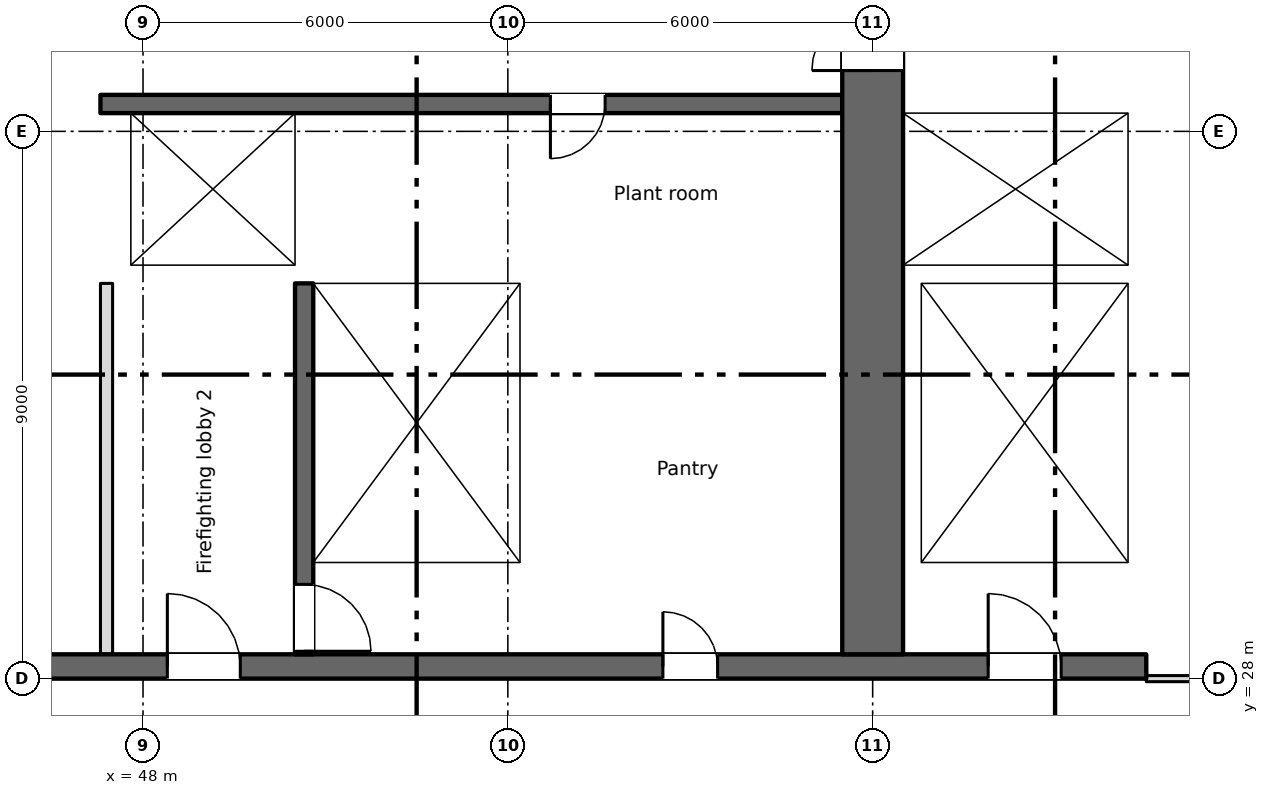
"""IFC4 building model, lengths in metres.
Left out: names, types, materials, properties, quantities, classifications, styles, units other than length and angle.
Written with IfcOpenShell. Run it as: python <this file> out.ifc"""

import sys

from ifc_helpers import new_model, si_unit, direction, frame, frame_2d, origin, place, context, subcontext, project, spatial, rectangle, extrude, element, fill, save


model = new_model("IFC4")
c1 = context("Model", 3, precision=1e-05, world=origin(), true_north=direction((0.0, 1.0)))
c2 = subcontext(c1, "Body", "Model", "MODEL_VIEW")
j1 = project(units=[si_unit("LENGTHUNIT", "METRE"), si_unit("PLANEANGLEUNIT", "RADIAN")], contexts=[c1])
p1 = place(None, origin())
s1 = spatial("IfcSite", under=j1, at=p1, CompositionType="ELEMENT")
p2 = place(p1, origin())
s2 = spatial("IfcBuilding", under=s1, at=p2, CompositionType="ELEMENT")
p3 = place(p2, frame((0.0, 0.0, 26.25)))
s3 = spatial("IfcBuildingStorey", under=s2, at=p3, CompositionType="ELEMENT", Elevation=26.25)
p4 = place(p3, frame((6.7, 28.2, 0.0), z_axis=(0.0, 0.0, 1.0), x_axis=(1.0, 0.0, 0.0)))
e1 = element("IfcWall", 1, at=p4, inside=s3, PredefinedType="SHEAR", context=c2, shape_type="SweptSolid", body=[
    extrude(rectangle(XDim=57.8, YDim=0.4, at=frame_2d((28.9, 0.0))), origin(), (0.0, 0.0, 1.0), 3.35),
])
p5 = place(p4, frame((12.562, 0.0, 0.0)))
e2 = element("IfcOpeningElement", 2, at=p5, cuts=e1, PredefinedType="OPENING", context=c2, shape_type="SweptSolid", body=[
    extrude(rectangle(XDim=0.9, YDim=2.1, at=frame_2d((0.45, 1.05))), frame((0.0, 0.21, 0.0), z_axis=(0.0, -1.0, 0.0), x_axis=(1.0, 0.0, 0.0)), (0.0, 0.0, 1.0), 0.42),
])
p6 = place(p4, frame((15.137, 0.0, 0.0)))
e3 = element("IfcOpeningElement", 3, at=p6, cuts=e1, PredefinedType="OPENING", context=c2, shape_type="SweptSolid", body=[
    extrude(rectangle(XDim=0.9, YDim=2.1, at=frame_2d((0.45, 1.05))), frame((0.0, 0.21, 0.0), z_axis=(0.0, -1.0, 0.0), x_axis=(1.0, 0.0, 0.0)), (0.0, 0.0, 1.0), 0.42),
])
p7 = place(p4, frame((49.85, 0.0, 0.0)))
e4 = element("IfcOpeningElement", 4, at=p7, cuts=e1, PredefinedType="OPENING", context=c2, shape_type="SweptSolid", body=[
    extrude(rectangle(XDim=0.9, YDim=2.1, at=frame_2d((0.45, 1.05))), frame((0.0, 0.21, 0.0), z_axis=(0.0, -1.0, 0.0), x_axis=(1.0, 0.0, 0.0)), (0.0, 0.0, 1.0), 0.42),
])
p8 = place(p4, frame((0.562, 0.0, 0.0)))
e5 = element("IfcOpeningElement", 5, at=p8, cuts=e1, PredefinedType="OPENING", context=c2, shape_type="SweptSolid", body=[
    extrude(rectangle(XDim=0.9, YDim=2.1, at=frame_2d((0.45, 1.05))), frame((0.0, 0.21, 0.0), z_axis=(0.0, -1.0, 0.0), x_axis=(1.0, 0.0, 0.0)), (0.0, 0.0, 1.0), 0.42),
])
p9 = place(p4, frame((2.137, 0.0, 0.0)))
e6 = element("IfcOpeningElement", 6, at=p9, cuts=e1, PredefinedType="OPENING", context=c2, shape_type="SweptSolid", body=[
    extrude(rectangle(XDim=0.9, YDim=2.1, at=frame_2d((0.45, 1.05))), frame((0.0, 0.21, 0.0), z_axis=(0.0, -1.0, 0.0), x_axis=(1.0, 0.0, 0.0)), (0.0, 0.0, 1.0), 0.42),
])
p10 = place(p4, frame((4.7, 0.0, 0.0)))
e7 = element("IfcOpeningElement", 7, at=p10, cuts=e1, PredefinedType="OPENING", context=c2, shape_type="SweptSolid", body=[
    extrude(rectangle(XDim=1.2, YDim=2.1, at=frame_2d((0.6, 1.05))), frame((0.0, 0.21, 0.0), z_axis=(0.0, -1.0, 0.0), x_axis=(1.0, 0.0, 0.0)), (0.0, 0.0, 1.0), 0.42),
])
p11 = place(p4, frame((31.7, 0.0, 0.0)))
e8 = element("IfcOpeningElement", 8, at=p11, cuts=e1, PredefinedType="OPENING", context=c2, shape_type="SweptSolid", body=[
    extrude(rectangle(XDim=1.2, YDim=2.1, at=frame_2d((0.6, 1.05))), frame((0.0, 0.21, 0.0), z_axis=(0.0, -1.0, 0.0), x_axis=(1.0, 0.0, 0.0)), (0.0, 0.0, 1.0), 0.42),
])
p12 = place(p4, frame((55.2, 0.0, 0.0)))
e9 = element("IfcOpeningElement", 9, at=p12, cuts=e1, PredefinedType="OPENING", context=c2, shape_type="SweptSolid", body=[
    extrude(rectangle(XDim=1.2, YDim=2.1, at=frame_2d((0.6, 1.05))), frame((0.0, 0.21, 0.0), z_axis=(0.0, -1.0, 0.0), x_axis=(1.0, 0.0, 0.0)), (0.0, 0.0, 1.0), 0.42),
])
p13 = place(p4, frame((21.7, 0.0, 0.0)))
e10 = element("IfcOpeningElement", 10, at=p13, cuts=e1, PredefinedType="OPENING", context=c2, shape_type="SweptSolid", body=[
    extrude(rectangle(XDim=1.2, YDim=2.1, at=frame_2d((0.6, 1.05))), frame((0.0, 0.21, 0.0), z_axis=(0.0, -1.0, 0.0), x_axis=(1.0, 0.0, 0.0)), (0.0, 0.0, 1.0), 0.42),
])
p14 = place(p4, frame((41.7, 0.0, 0.0)))
e11 = element("IfcOpeningElement", 11, at=p14, cuts=e1, PredefinedType="OPENING", context=c2, shape_type="SweptSolid", body=[
    extrude(rectangle(XDim=1.2, YDim=2.1, at=frame_2d((0.6, 1.05))), frame((0.0, 0.21, 0.0), z_axis=(0.0, -1.0, 0.0), x_axis=(1.0, 0.0, 0.0)), (0.0, 0.0, 1.0), 0.42),
])
p15 = place(p4, frame((24.85, 0.0, 0.0)))
e12 = element("IfcOpeningElement", 12, at=p15, cuts=e1, PredefinedType="OPENING", context=c2, shape_type="SweptSolid", body=[
    extrude(rectangle(XDim=2.4, YDim=2.1, at=frame_2d((1.2, 1.05))), frame((0.0, 0.21, 0.0), z_axis=(0.0, -1.0, 0.0), x_axis=(1.0, 0.0, 0.0)), (0.0, 0.0, 1.0), 0.42),
])
p16 = place(p4, frame((37.35, 0.0, 0.0)))
e13 = element("IfcOpeningElement", 13, at=p16, cuts=e1, PredefinedType="OPENING", context=c2, shape_type="SweptSolid", body=[
    extrude(rectangle(XDim=2.4, YDim=2.1, at=frame_2d((1.2, 1.05))), frame((0.0, 0.21, 0.0), z_axis=(0.0, -1.0, 0.0), x_axis=(1.0, 0.0, 0.0)), (0.0, 0.0, 1.0), 0.42),
])
p17 = place(p4, frame((7.85, 0.0, 0.0)))
e14 = element("IfcOpeningElement", 14, at=p17, cuts=e1, PredefinedType="OPENING", context=c2, shape_type="SweptSolid", body=[
    extrude(rectangle(XDim=2.4, YDim=2.1, at=frame_2d((1.2, 1.05))), frame((0.0, 0.21, 0.0), z_axis=(0.0, -1.0, 0.0), x_axis=(1.0, 0.0, 0.0)), (0.0, 0.0, 1.0), 0.42),
])
p18 = place(p4, frame((28.85, 0.0, 0.0)))
e15 = element("IfcOpeningElement", 15, at=p18, cuts=e1, PredefinedType="OPENING", context=c2, shape_type="SweptSolid", body=[
    extrude(rectangle(XDim=0.9, YDim=2.1, at=frame_2d((0.45, 1.05))), frame((0.0, 0.21, 0.0), z_axis=(0.0, -1.0, 0.0), x_axis=(1.0, 0.0, 0.0)), (0.0, 0.0, 1.0), 0.42),
])
p19 = place(p4, frame((34.85, 0.0, 0.0)))
e16 = element("IfcOpeningElement", 16, at=p19, cuts=e1, PredefinedType="OPENING", context=c2, shape_type="SweptSolid", body=[
    extrude(rectangle(XDim=0.9, YDim=2.1, at=frame_2d((0.45, 1.05))), frame((0.0, 0.21, 0.0), z_axis=(0.0, -1.0, 0.0), x_axis=(1.0, 0.0, 0.0)), (0.0, 0.0, 1.0), 0.42),
])
p20 = place(p3, frame((64.35, 34.8, 0.0), z_axis=(0.0, 0.0, 1.0), x_axis=(0.0, 1.0, 0.0)))
e17 = element("IfcWall", 17, at=p20, inside=s3, PredefinedType="SHEAR", context=c2, shape_type="SweptSolid", body=[
    extrude(rectangle(XDim=10.2, YDim=0.3, at=frame_2d((5.1, 0.0))), origin(), (0.0, 0.0, 1.0), 3.35),
])
p21 = place(p3, frame((60.0, 28.4, 0.0), z_axis=(0.0, 0.0, 1.0), x_axis=(0.0, 1.0, 0.0)))
e18 = element("IfcWall", 18, at=p21, inside=s3, PredefinedType="SHEAR", context=c2, shape_type="SweptSolid", body=[
    extrude(rectangle(XDim=16.6, YDim=1.0, at=frame_2d((8.3, 0.0))), origin(), (0.0, 0.0, 1.0), 3.35),
])
p22 = place(p21, frame((9.6, 0.0, 0.0)))
e19 = element("IfcOpeningElement", 19, at=p22, cuts=e18, PredefinedType="OPENING", context=c2, shape_type="SweptSolid", body=[
    extrude(rectangle(XDim=2.0, YDim=2.1, at=frame_2d((1.0, 1.05))), frame((0.0, 0.51, 0.0), z_axis=(0.0, -1.0, 0.0), x_axis=(1.0, 0.0, 0.0)), (0.0, 0.0, 1.0), 1.02),
])
p23 = place(p21, frame((15.25, 0.0, 0.0)))
e20 = element("IfcOpeningElement", 20, at=p23, cuts=e18, PredefinedType="OPENING", context=c2, shape_type="SweptSolid", body=[
    extrude(rectangle(XDim=1.2, YDim=2.1, at=frame_2d((0.6, 1.05))), frame((0.0, 0.51, 0.0), z_axis=(0.0, -1.0, 0.0), x_axis=(1.0, 0.0, 0.0)), (0.0, 0.0, 1.0), 1.02),
])
p24 = place(p3, frame((50.65, 34.5, 0.0), z_axis=(0.0, 0.0, 1.0), x_axis=(0.0, -1.0, 0.0)))
e21 = element("IfcWall", 21, at=p24, inside=s3, PredefinedType="SHEAR", context=c2, shape_type="SweptSolid", body=[
    extrude(rectangle(XDim=6.1, YDim=0.3, at=frame_2d((3.05, 0.0))), origin(), (0.0, 0.0, 1.0), 3.35),
])
p25 = place(p24, frame((4.95, 0.0, 0.0)))
e22 = element("IfcOpeningElement", 22, at=p25, cuts=e21, PredefinedType="OPENING", context=c2, shape_type="SweptSolid", body=[
    extrude(rectangle(XDim=1.1, YDim=2.1, at=frame_2d((0.55, 1.05))), frame((0.0, 0.16, 0.0), z_axis=(0.0, -1.0, 0.0), x_axis=(1.0, 0.0, 0.0)), (0.0, 0.0, 1.0), 0.32),
])
for number, where, z_axis, x_axis in (
    (23, (54.35, 28.4, 0.0), (0.0, 0.0, 1.0), (0.0, 1.0, 0.0)),
    (24, (60.65, 28.4, 0.0), (0.0, 0.0, 1.0), (0.0, 1.0, 0.0)),
    (25, (64.35, 28.4, 0.0), (0.0, 0.0, 1.0), (0.0, 1.0, 0.0)),
):
    element("IfcWall", number, at=place(p3, frame(where, z_axis=z_axis, x_axis=x_axis)), inside=s3, PredefinedType="SHEAR", context=c2, shape_type="SweptSolid", body=[
        extrude(rectangle(XDim=6.1, YDim=0.3, at=frame_2d((3.05, 0.0))), origin(), (0.0, 0.0, 1.0), 3.35),
    ])
p26 = place(p3, frame((47.3, 34.65, 0.0), z_axis=(0.0, 0.0, 1.0), x_axis=(1.0, 0.0, 0.0)))
e26 = element("IfcWall", 26, at=p26, inside=s3, PredefinedType="SHEAR", context=c2, shape_type="SweptSolid", body=[
    extrude(rectangle(XDim=12.2, YDim=0.3, at=frame_2d((6.1, 0.0))), origin(), (0.0, 0.0, 1.0), 3.35),
])
p27 = place(p26, frame((1.3, 0.0, 0.0)))
e27 = element("IfcOpeningElement", 27, at=p27, cuts=e26, PredefinedType="OPENING", context=c2, shape_type="SweptSolid", body=[
    extrude(rectangle(XDim=1.1, YDim=2.1, at=frame_2d((0.55, 1.05))), frame((0.0, 0.16, 0.0), z_axis=(0.0, -1.0, 0.0), x_axis=(1.0, 0.0, 0.0)), (0.0, 0.0, 1.0), 0.32),
])
p28 = place(p3, frame((60.5, 34.65, 0.0), z_axis=(0.0, 0.0, 1.0), x_axis=(1.0, 0.0, 0.0)))
e28 = element("IfcWall", 28, at=p28, inside=s3, PredefinedType="SHEAR", context=c2, shape_type="SweptSolid", body=[
    extrude(rectangle(XDim=4.0, YDim=0.3, at=frame_2d((2.0, 0.0))), origin(), (0.0, 0.0, 1.0), 3.35),
])
p29 = place(p3, frame((59.5, 37.45, 0.0), z_axis=(0.0, 0.0, 1.0), x_axis=(-1.0, 0.0, 0.0)))
e29 = element("IfcWall", 29, at=p29, inside=s3, PredefinedType="SHEAR", context=c2, shape_type="SweptSolid", body=[
    extrude(rectangle(XDim=12.2, YDim=0.3, at=frame_2d((6.1, 0.0))), origin(), (0.0, 0.0, 1.0), 3.35),
])
p30 = place(p29, frame((3.9, 0.0, 0.0)))
e30 = element("IfcOpeningElement", 30, at=p30, cuts=e29, PredefinedType="OPENING", context=c2, shape_type="SweptSolid", body=[
    extrude(rectangle(XDim=0.9, YDim=2.1, at=frame_2d((0.45, 1.05))), frame((0.0, 0.16, 0.0), z_axis=(0.0, -1.0, 0.0), x_axis=(1.0, 0.0, 0.0)), (0.0, 0.0, 1.0), 0.32),
])
p31 = place(p3, frame((60.5, 37.45, 0.0), z_axis=(0.0, 0.0, 1.0), x_axis=(1.0, 0.0, 0.0)))
e31 = element("IfcWall", 31, at=p31, inside=s3, PredefinedType="SHEAR", context=c2, shape_type="SweptSolid", body=[
    extrude(rectangle(XDim=3.7, YDim=0.3, at=frame_2d((1.85, 0.0))), origin(), (0.0, 0.0, 1.0), 3.35),
])
p32 = place(p31, frame((1.3, 0.0, 0.0)))
e32 = element("IfcOpeningElement", 32, at=p32, cuts=e31, PredefinedType="OPENING", context=c2, shape_type="SweptSolid", body=[
    extrude(rectangle(XDim=1.1, YDim=2.1, at=frame_2d((0.55, 1.05))), frame((0.0, 0.16, 0.0), z_axis=(0.0, -1.0, 0.0), x_axis=(1.0, 0.0, 0.0)), (0.0, 0.0, 1.0), 0.32),
])
p33 = place(p3, frame((47.55, 34.8, 0.0), z_axis=(0.0, 0.0, 1.0), x_axis=(0.0, 1.0, 0.0)))
e33 = element("IfcWall", 33, at=p33, inside=s3, PredefinedType="SHEAR", context=c2, shape_type="SweptSolid", body=[
    extrude(rectangle(XDim=2.5, YDim=0.5, at=frame_2d((1.25, 0.0))), origin(), (0.0, 0.0, 1.0), 3.35),
])
p34 = place(p3, frame((50.65, 34.8, 0.0), z_axis=(0.0, 0.0, 1.0), x_axis=(0.0, 1.0, 0.0)))
e34 = element("IfcWall", 34, at=p34, inside=s3, PredefinedType="SHEAR", context=c2, shape_type="SweptSolid", body=[
    extrude(rectangle(XDim=2.5, YDim=0.3, at=frame_2d((1.25, 0.0))), origin(), (0.0, 0.0, 1.0), 3.35),
])
p35 = place(p3, frame((47.4, 28.4, 0.0), z_axis=(0.0, 0.0, 1.0), x_axis=(0.0, 1.0, 0.0)))
e35 = element("IfcWall", 35, at=p35, inside=s3, PredefinedType="PARTITIONING", context=c2, shape_type="SweptSolid", body=[
    extrude(rectangle(XDim=6.1, YDim=0.2, at=frame_2d((3.05, 0.0))), origin(), (0.0, 0.0, 1.0), 3.35),
])
p36 = place(p3, frame((64.5, 28.0, 0.0), z_axis=(0.0, 0.0, 1.0), x_axis=(1.0, 0.0, 0.0)))
e36 = element("IfcWall", 36, at=p36, inside=s3, PredefinedType="PARTITIONING", context=c2, shape_type="SweptSolid", body=[
    extrude(rectangle(XDim=12.7, YDim=0.1, at=frame_2d((6.35, 0.0))), origin(), (0.0, 0.0, 1.0), 3.35),
])
p37 = place(p36, frame((7.475, 0.0, 0.0)))
e37 = element("IfcOpeningElement", 37, at=p37, cuts=e36, PredefinedType="OPENING", context=c2, shape_type="SweptSolid", body=[
    extrude(rectangle(XDim=1.8, YDim=2.1, at=frame_2d((0.9, 1.05))), frame((0.0, 0.06, 0.0), z_axis=(0.0, -1.0, 0.0), x_axis=(1.0, 0.0, 0.0)), (0.0, 0.0, 1.0), 0.12),
])
p38 = place(p36, frame((1.525, 0.0, 0.0)))
e38 = element("IfcOpeningElement", 38, at=p38, cuts=e36, PredefinedType="OPENING", context=c2, shape_type="SweptSolid", body=[
    extrude(rectangle(XDim=1.0, YDim=2.1, at=frame_2d((0.5, 1.05))), frame((0.0, 0.06, 0.0), z_axis=(0.0, -1.0, 0.0), x_axis=(1.0, 0.0, 0.0)), (0.0, 0.0, 1.0), 0.12),
])
p39 = place(p7, origin())
e39 = element("IfcDoor", 39, at=p39, inside=s3, OperationType="SINGLE_SWING_LEFT", PredefinedType="DOOR", context=c2, shape_type="SweptSolid", body=[
    extrude(rectangle(XDim=0.9, YDim=2.1, at=frame_2d((0.45, 1.05))), frame((0.0, 0.025, 0.0), z_axis=(0.0, -1.0, 0.0), x_axis=(1.0, 0.0, 0.0)), (0.0, 0.0, 1.0), 0.05),
])
fill(e4, e39)
p40 = place(p30, origin())
e40 = element("IfcDoor", 40, at=p40, inside=s3, OperationType="SINGLE_SWING_RIGHT", PredefinedType="DOOR", context=c2, shape_type="SweptSolid", body=[
    extrude(rectangle(XDim=0.9, YDim=2.1, at=frame_2d((0.45, 1.05))), frame((0.0, 0.025, 0.0), z_axis=(0.0, -1.0, 0.0), x_axis=(1.0, 0.0, 0.0)), (0.0, 0.0, 1.0), 0.05),
])
fill(e30, e40)
p41 = place(p32, origin())
e41 = element("IfcDoor", 41, at=p41, inside=s3, OperationType="SLIDING_TO_LEFT", PredefinedType="DOOR", context=c2, shape_type="SweptSolid", body=[
    extrude(rectangle(XDim=1.1, YDim=2.1, at=frame_2d((0.55, 1.05))), frame((0.0, 0.025, 0.0), z_axis=(0.0, -1.0, 0.0), x_axis=(1.0, 0.0, 0.0)), (0.0, 0.0, 1.0), 0.05),
])
fill(e32, e41)
p42 = place(p27, origin())
e42 = element("IfcDoor", 42, at=p42, inside=s3, OperationType="SLIDING_TO_LEFT", PredefinedType="DOOR", context=c2, shape_type="SweptSolid", body=[
    extrude(rectangle(XDim=1.1, YDim=2.1, at=frame_2d((0.55, 1.05))), frame((0.0, 0.025, 0.0), z_axis=(0.0, -1.0, 0.0), x_axis=(1.0, 0.0, 0.0)), (0.0, 0.0, 1.0), 0.05),
])
fill(e27, e42)
p43 = place(p25, origin())
e43 = element("IfcDoor", 43, at=p43, inside=s3, OperationType="SINGLE_SWING_RIGHT", PredefinedType="DOOR", context=c2, shape_type="SweptSolid", body=[
    extrude(rectangle(XDim=1.1, YDim=2.1, at=frame_2d((0.55, 1.05))), frame((0.0, 0.025, 0.0), z_axis=(0.0, -1.0, 0.0), x_axis=(1.0, 0.0, 0.0)), (0.0, 0.0, 1.0), 0.05),
])
fill(e22, e43)
p44 = place(p12, origin())
e44 = element("IfcDoor", 44, at=p44, inside=s3, OperationType="SINGLE_SWING_LEFT", PredefinedType="DOOR", context=c2, shape_type="SweptSolid", body=[
    extrude(rectangle(XDim=1.2, YDim=2.1, at=frame_2d((0.6, 1.05))), frame((0.0, 0.025, 0.0), z_axis=(0.0, -1.0, 0.0), x_axis=(1.0, 0.0, 0.0)), (0.0, 0.0, 1.0), 0.05),
])
fill(e9, e44)
p45 = place(p14, origin())
e45 = element("IfcDoor", 45, at=p45, inside=s3, OperationType="SINGLE_SWING_LEFT", PredefinedType="DOOR", context=c2, shape_type="SweptSolid", body=[
    extrude(rectangle(XDim=1.2, YDim=2.1, at=frame_2d((0.6, 1.05))), frame((0.0, 0.025, 0.0), z_axis=(0.0, -1.0, 0.0), x_axis=(1.0, 0.0, 0.0)), (0.0, 0.0, 1.0), 0.05),
])
fill(e11, e45)
p46 = place(p22, origin())
e46 = element("IfcDoor", 46, at=p46, inside=s3, OperationType="DOUBLE_DOOR_SINGLE_SWING", PredefinedType="DOOR", context=c2, shape_type="SweptSolid", body=[
    extrude(rectangle(XDim=2.0, YDim=2.1, at=frame_2d((1.0, 1.05))), frame((0.0, 0.025, 0.0), z_axis=(0.0, -1.0, 0.0), x_axis=(1.0, 0.0, 0.0)), (0.0, 0.0, 1.0), 0.05),
])
fill(e19, e46)
save(model, sys.argv[1])
